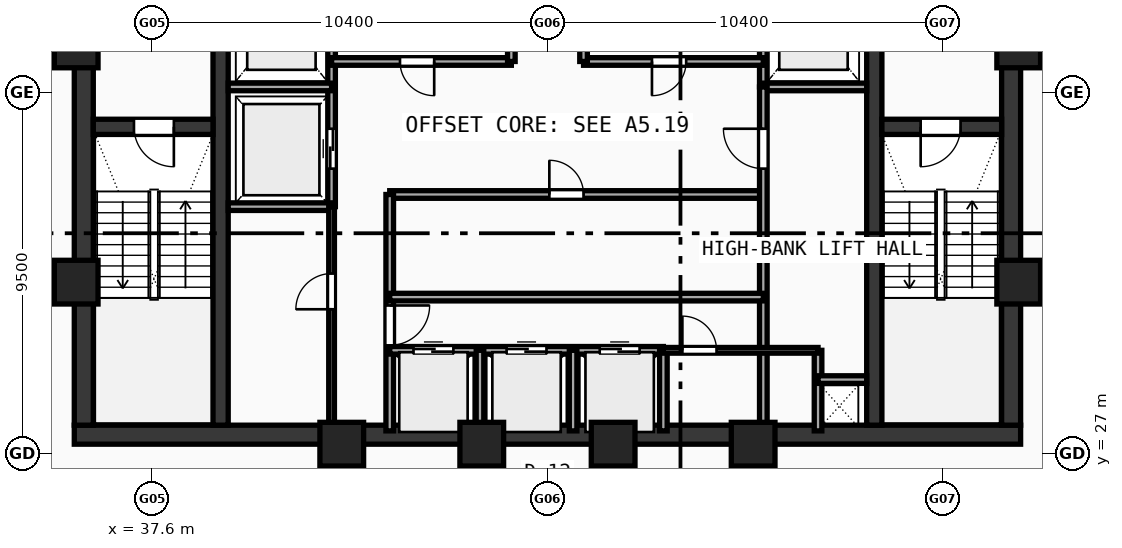
"""IFC4 building model, lengths in metres.
Left out: names, types, materials, properties, quantities, classifications, styles, units other than length and angle.
Written with IfcOpenShell. Run it as: python <this file> out.ifc"""

import sys

from ifc_helpers import new_model, si_unit, direction, frame, frame_2d, origin, origin_with_axes, origin_2d, place, context, subcontext, project, spatial, rectangle, hollow_rectangle, extrude, source, transform, mapped, element, fill, save


model = new_model("IFC4")
c1 = context("Model", 3, precision=1e-05, world=origin(), true_north=direction((0.0, 1.0)))
c2 = subcontext(c1, "Body", "Model", "MODEL_VIEW")
j1 = project(units=[si_unit("LENGTHUNIT", "METRE"), si_unit("PLANEANGLEUNIT", "RADIAN")], contexts=[c1])
p1 = place(None, origin())
s1 = spatial("IfcSite", under=j1, at=p1, CompositionType="ELEMENT")
p2 = place(p1, origin())
s2 = spatial("IfcBuilding", under=s1, at=p2, CompositionType="ELEMENT")
p3 = place(p2, frame((0.0, 0.0, 307.4)))
s3 = spatial("IfcBuildingStorey", under=s2, at=p3, CompositionType="ELEMENT", Elevation=307.4)
p4 = place(p3, frame((35.55, 27.5, 0.0), z_axis=(0.0, 0.0, 1.0), x_axis=(1.0, 0.0, 0.0)))
e1 = element("IfcWall", 1, at=p4, inside=s3, PredefinedType="SHEAR", context=c2, shape_type="SweptSolid", body=[
    extrude(rectangle(XDim=24.9, YDim=0.5, at=frame_2d((12.45, 0.0))), origin(), (0.0, 0.0, 1.0), 3.47),
])
for number, where, z_axis, x_axis in (
    (2, (35.8, 27.75, 0.0), (0.0, 0.0, 1.0), (0.0, 1.0, 0.0)),
    (3, (60.2, 27.75, 0.0), (0.0, 0.0, 1.0), (0.0, 1.0, 0.0)),
):
    element("IfcWall", number, at=place(p3, frame(where, z_axis=z_axis, x_axis=x_axis)), inside=s3, PredefinedType="SHEAR", context=c2, shape_type="SweptSolid", body=[
        extrude(rectangle(XDim=12.2, YDim=0.5, at=frame_2d((6.1, 0.0))), origin(), (0.0, 0.0, 1.0), 3.47),
    ])
p5 = place(p3, frame((39.4, 27.75, 0.0), z_axis=(0.0, 0.0, 1.0), x_axis=(0.0, 1.0, 0.0)))
e4 = element("IfcWall", 4, at=p5, inside=s3, PredefinedType="SHEAR", context=c2, shape_type="SweptSolid", body=[
    extrude(rectangle(XDim=12.2, YDim=0.4, at=frame_2d((6.1, 0.0))), origin(), (0.0, 0.0, 1.0), 3.47),
])
p6 = place(p5, frame((10.0, 0.0, 0.0)))
e5 = element("IfcOpeningElement", 5, at=p6, cuts=e4, PredefinedType="OPENING", context=c2, shape_type="SweptSolid", body=[
    extrude(rectangle(XDim=1.1, YDim=2.1, at=frame_2d((0.55, 1.05))), frame((0.0, 0.21, 0.0), z_axis=(0.0, -1.0, 0.0), x_axis=(1.0, 0.0, 0.0)), (0.0, 0.0, 1.0), 0.42),
])
p7 = place(p3, frame((56.6, 27.75, 0.0), z_axis=(0.0, 0.0, 1.0), x_axis=(0.0, 1.0, 0.0)))
e6 = element("IfcWall", 6, at=p7, inside=s3, PredefinedType="SHEAR", context=c2, shape_type="SweptSolid", body=[
    extrude(rectangle(XDim=12.2, YDim=0.4, at=frame_2d((6.1, 0.0))), origin(), (0.0, 0.0, 1.0), 3.47),
])
p8 = place(p7, frame((10.0, 0.0, 0.0)))
e7 = element("IfcOpeningElement", 7, at=p8, cuts=e6, PredefinedType="OPENING", context=c2, shape_type="SweptSolid", body=[
    extrude(rectangle(XDim=1.1, YDim=2.1, at=frame_2d((0.55, 1.05))), frame((0.0, 0.21, 0.0), z_axis=(0.0, -1.0, 0.0), x_axis=(1.0, 0.0, 0.0)), (0.0, 0.0, 1.0), 0.42),
])
p9 = place(p3, frame((36.05, 35.6, 0.0), z_axis=(0.0, 0.0, 1.0), x_axis=(1.0, 0.0, 0.0)))
e8 = element("IfcWall", 8, at=p9, inside=s3, PredefinedType="SHEAR", context=c2, shape_type="SweptSolid", body=[
    extrude(rectangle(XDim=3.15, YDim=0.4, at=frame_2d((1.575, 0.0))), origin(), (0.0, 0.0, 1.0), 3.47),
])
p10 = place(p9, frame((1.07, 0.0, 0.0)))
e9 = element("IfcOpeningElement", 9, at=p10, cuts=e8, PredefinedType="OPENING", context=c2, shape_type="SweptSolid", body=[
    extrude(rectangle(XDim=1.05, YDim=2.1, at=frame_2d((0.525, 1.05))), frame((0.0, 0.21, 0.0), z_axis=(0.0, -1.0, 0.0), x_axis=(1.0, 0.0, 0.0)), (0.0, 0.0, 1.0), 0.42),
])
p11 = place(p3, frame((56.8, 35.6, 0.0), z_axis=(0.0, 0.0, 1.0), x_axis=(1.0, 0.0, 0.0)))
e10 = element("IfcWall", 10, at=p11, inside=s3, PredefinedType="SHEAR", context=c2, shape_type="SweptSolid", body=[
    extrude(rectangle(XDim=3.15, YDim=0.4, at=frame_2d((1.575, 0.0))), origin(), (0.0, 0.0, 1.0), 3.47),
])
p12 = place(p11, frame((1.02, 0.0, 0.0)))
e11 = element("IfcOpeningElement", 11, at=p12, cuts=e10, PredefinedType="OPENING", context=c2, shape_type="SweptSolid", body=[
    extrude(rectangle(XDim=1.05, YDim=2.1, at=frame_2d((0.525, 1.05))), frame((0.0, 0.21, 0.0), z_axis=(0.0, -1.0, 0.0), x_axis=(1.0, 0.0, 0.0)), (0.0, 0.0, 1.0), 0.42),
])
m1 = source(origin(), c2, "Body", "SweptSolid", [
    extrude(hollow_rectangle(XDim=1.15, YDim=1.15, WallThickness=0.048, at=origin_2d()), origin(), (0.0, 0.0, 1.0), 3.73),
])
for number, where, z_axis, x_axis in (
    (12, (42.588, 27.25, -0.26), (0.0, 0.0, 1.0), (1.0, 0.0, 0.0)),
    (13, (46.272, 27.25, -0.26), (0.0, 0.0, 1.0), (1.0, 0.0, 0.0)),
    (14, (49.729, 27.25, -0.26), (0.0, 0.0, 1.0), (1.0, 0.0, 0.0)),
    (15, (53.412, 27.25, -0.26), (0.0, 0.0, 1.0), (1.0, 0.0, 0.0)),
    (16, (60.4, 31.513, -0.26), (0.0, 0.0, 1.0), (1.0, 0.0, 0.0)),
    (17, (60.4, 37.729, -0.26), (0.0, 0.0, 1.0), (1.0, 0.0, 0.0)),
    (18, (35.6, 37.729, -0.26), (0.0, 0.0, 1.0), (1.0, 0.0, 0.0)),
    (19, (35.6, 31.513, -0.26), (0.0, 0.0, 1.0), (1.0, 0.0, 0.0)),
):
    element("IfcColumn", number, at=place(p3, frame(where, z_axis=z_axis, x_axis=x_axis)), inside=s3, PredefinedType="COLUMN", context=c2, shape_type="MappedRepresentation", body=[
        mapped(m1, transform((0.0, 0.0, 0.0), scale=1.0)),
    ])
p13 = place(p3, frame((42.32, 33.5, 0.0), z_axis=(0.0, 0.0, 1.0), x_axis=(0.0, 1.0, 0.0)))
e20 = element("IfcWall", 20, at=p13, inside=s3, PredefinedType="SOLIDWALL", context=c2, shape_type="SweptSolid", body=[
    extrude(rectangle(XDim=6.45, YDim=0.2, at=frame_2d((3.225, 0.0))), origin(), (0.0, 0.0, 1.0), 3.47),
])
p14 = place(p13, frame((1.0, 0.0, 0.0)))
e21 = element("IfcOpeningElement", 21, at=p14, cuts=e20, PredefinedType="OPENING", context=c2, shape_type="SweptSolid", body=[
    extrude(rectangle(XDim=1.05, YDim=2.1, at=frame_2d((0.525, 1.05))), frame((0.0, 0.11, 0.0), z_axis=(0.0, -1.0, 0.0), x_axis=(1.0, 0.0, 0.0)), (0.0, 0.0, 1.0), 0.22),
])
for number, where, z_axis, x_axis in (
    (22, (39.6, 36.65, 0.0), (0.0, 0.0, 1.0), (1.0, 0.0, 0.0)),
    (23, (39.6, 33.5, 0.0), (0.0, 0.0, 1.0), (1.0, 0.0, 0.0)),
):
    element("IfcWall", number, at=place(p3, frame(where, z_axis=z_axis, x_axis=x_axis)), inside=s3, PredefinedType="SOLIDWALL", context=c2, shape_type="SweptSolid", body=[
        extrude(rectangle(XDim=2.72, YDim=0.2, at=frame_2d((1.36, 0.0))), origin(), (0.0, 0.0, 1.0), 3.47),
    ])
p15 = place(p3, frame((53.68, 36.65, 0.0), z_axis=(0.0, 0.0, 1.0), x_axis=(0.0, 1.0, 0.0)))
e24 = element("IfcWall", 24, at=p15, inside=s3, PredefinedType="SOLIDWALL", context=c2, shape_type="SweptSolid", body=[
    extrude(rectangle(XDim=3.3, YDim=0.2, at=frame_2d((1.65, 0.0))), origin(), (0.0, 0.0, 1.0), 3.47),
])
p16 = place(p3, frame((53.68, 36.65, 0.0), z_axis=(0.0, 0.0, 1.0), x_axis=(1.0, 0.0, 0.0)))
e25 = element("IfcWall", 25, at=p16, inside=s3, PredefinedType="SOLIDWALL", context=c2, shape_type="SweptSolid", body=[
    extrude(rectangle(XDim=2.72, YDim=0.2, at=frame_2d((1.36, 0.0))), origin(), (0.0, 0.0, 1.0), 3.47),
])
p17 = place(p3, frame((42.32, 37.32, 0.0), z_axis=(0.0, 0.0, 1.0), x_axis=(1.0, 0.0, 0.0)))
e26 = element("IfcWall", 26, at=p17, inside=s3, PredefinedType="SOLIDWALL", context=c2, shape_type="SweptSolid", body=[
    extrude(rectangle(XDim=4.73, YDim=0.2, at=frame_2d((2.365, 0.0))), origin(), (0.0, 0.0, 1.0), 3.47),
])
p18 = place(p17, frame((1.8, 0.0, 0.0)))
e27 = element("IfcOpeningElement", 27, at=p18, cuts=e26, PredefinedType="OPENING", context=c2, shape_type="SweptSolid", body=[
    extrude(rectangle(XDim=0.9, YDim=2.1, at=frame_2d((0.45, 1.05))), frame((0.0, 0.11, 0.0), z_axis=(0.0, -1.0, 0.0), x_axis=(1.0, 0.0, 0.0)), (0.0, 0.0, 1.0), 0.22),
])
p19 = place(p3, frame((48.95, 37.32, 0.0), z_axis=(0.0, 0.0, 1.0), x_axis=(1.0, 0.0, 0.0)))
e28 = element("IfcWall", 28, at=p19, inside=s3, PredefinedType="SOLIDWALL", context=c2, shape_type="SweptSolid", body=[
    extrude(rectangle(XDim=4.73, YDim=0.2, at=frame_2d((2.365, 0.0))), origin(), (0.0, 0.0, 1.0), 3.47),
])
p20 = place(p19, frame((1.8, 0.0, 0.0)))
e29 = element("IfcOpeningElement", 29, at=p20, cuts=e28, PredefinedType="OPENING", context=c2, shape_type="SweptSolid", body=[
    extrude(rectangle(XDim=0.9, YDim=2.1, at=frame_2d((0.45, 1.05))), frame((0.0, 0.11, 0.0), z_axis=(0.0, -1.0, 0.0), x_axis=(1.0, 0.0, 0.0)), (0.0, 0.0, 1.0), 0.22),
])
for number, where, z_axis, x_axis in (
    (30, (47.05, 37.32, 0.0), (0.0, 0.0, 1.0), (0.0, 1.0, 0.0)),
    (31, (48.95, 37.32, 0.0), (0.0, 0.0, 1.0), (0.0, 1.0, 0.0)),
):
    element("IfcWall", number, at=place(p3, frame(where, z_axis=z_axis, x_axis=x_axis)), inside=s3, PredefinedType="SOLIDWALL", context=c2, shape_type="SweptSolid", body=[
        extrude(rectangle(XDim=2.63, YDim=0.2, at=frame_2d((1.315, 0.0))), origin(), (0.0, 0.0, 1.0), 3.47),
    ])
p21 = place(p3, frame((43.85, 33.82, 0.0), z_axis=(0.0, 0.0, 1.0), x_axis=(1.0, 0.0, 0.0)))
e32 = element("IfcWall", 32, at=p21, inside=s3, PredefinedType="SOLIDWALL", context=c2, shape_type="SweptSolid", body=[
    extrude(rectangle(XDim=9.83, YDim=0.2, at=frame_2d((4.915, 0.0))), origin(), (0.0, 0.0, 1.0), 3.47),
])
p22 = place(p21, frame((4.2, 0.0, 0.0)))
e33 = element("IfcOpeningElement", 33, at=p22, cuts=e32, PredefinedType="OPENING", context=c2, shape_type="SweptSolid", body=[
    extrude(rectangle(XDim=0.9, YDim=2.1, at=frame_2d((0.45, 1.05))), frame((0.0, 0.11, 0.0), z_axis=(0.0, -1.0, 0.0), x_axis=(1.0, 0.0, 0.0)), (0.0, 0.0, 1.0), 0.22),
])
p23 = place(p3, frame((43.85, 27.6, 0.0), z_axis=(0.0, 0.0, 1.0), x_axis=(0.0, 1.0, 0.0)))
e34 = element("IfcWall", 34, at=p23, inside=s3, PredefinedType="SOLIDWALL", context=c2, shape_type="SweptSolid", body=[
    extrude(rectangle(XDim=6.22, YDim=0.2, at=frame_2d((3.11, 0.0))), origin(), (0.0, 0.0, 1.0), 3.47),
])
p24 = place(p23, frame((2.25, 0.0, 0.0)))
e35 = element("IfcOpeningElement", 35, at=p24, cuts=e34, PredefinedType="OPENING", context=c2, shape_type="SweptSolid", body=[
    extrude(rectangle(XDim=1.05, YDim=2.1, at=frame_2d((0.525, 1.05))), frame((0.0, 0.11, 0.0), z_axis=(0.0, -1.0, 0.0), x_axis=(1.0, 0.0, 0.0)), (0.0, 0.0, 1.0), 0.22),
])
p25 = place(p3, frame((53.68, 27.6, 0.0), z_axis=(0.0, 0.0, 1.0), x_axis=(0.0, 1.0, 0.0)))
e36 = element("IfcWall", 36, at=p25, inside=s3, PredefinedType="SOLIDWALL", context=c2, shape_type="SweptSolid", body=[
    extrude(rectangle(XDim=9.05, YDim=0.2, at=frame_2d((4.525, 0.0))), origin(), (0.0, 0.0, 1.0), 3.47),
])
p26 = place(p25, frame((6.9, 0.0, 0.0)))
e37 = element("IfcOpeningElement", 37, at=p26, cuts=e36, PredefinedType="OPENING", context=c2, shape_type="SweptSolid", body=[
    extrude(rectangle(XDim=1.05, YDim=2.1, at=frame_2d((0.525, 1.05))), frame((0.0, 0.11, 0.0), z_axis=(0.0, -1.0, 0.0), x_axis=(1.0, 0.0, 0.0)), (0.0, 0.0, 1.0), 0.22),
])
p27 = place(p3, frame((43.85, 29.72, 0.0), z_axis=(0.0, 0.0, 1.0), x_axis=(1.0, 0.0, 0.0)))
e38 = element("IfcWall", 38, at=p27, inside=s3, PredefinedType="SOLIDWALL", context=c2, shape_type="SweptSolid", body=[
    extrude(rectangle(XDim=7.2, YDim=0.2, at=frame_2d((3.6, 0.0))), origin(), (0.0, 0.0, 1.0), 3.47),
])
p28 = place(p27, frame((0.625, 0.0, 0.0)))
e39 = element("IfcOpeningElement", 39, at=p28, cuts=e38, PredefinedType="OPENING", context=c2, shape_type="SweptSolid", body=[
    extrude(rectangle(XDim=1.05, YDim=2.1, at=frame_2d((0.525, 1.05))), frame((0.0, 0.11, 0.0), z_axis=(0.0, -1.0, 0.0), x_axis=(1.0, 0.0, 0.0)), (0.0, 0.0, 1.0), 0.22),
])
p29 = place(p27, frame((3.075, 0.0, 0.0)))
e40 = element("IfcOpeningElement", 40, at=p29, cuts=e38, PredefinedType="OPENING", context=c2, shape_type="SweptSolid", body=[
    extrude(rectangle(XDim=1.05, YDim=2.1, at=frame_2d((0.525, 1.05))), frame((0.0, 0.11, 0.0), z_axis=(0.0, -1.0, 0.0), x_axis=(1.0, 0.0, 0.0)), (0.0, 0.0, 1.0), 0.22),
])
p30 = place(p27, frame((5.525, 0.0, 0.0)))
e41 = element("IfcOpeningElement", 41, at=p30, cuts=e38, PredefinedType="OPENING", context=c2, shape_type="SweptSolid", body=[
    extrude(rectangle(XDim=1.05, YDim=2.1, at=frame_2d((0.525, 1.05))), frame((0.0, 0.11, 0.0), z_axis=(0.0, -1.0, 0.0), x_axis=(1.0, 0.0, 0.0)), (0.0, 0.0, 1.0), 0.22),
])
p31 = place(p3, frame((51.05, 27.6, 0.0), z_axis=(0.0, 0.0, 1.0), x_axis=(0.0, 1.0, 0.0)))
e42 = element("IfcWall", 42, at=p31, inside=s3, PredefinedType="SOLIDWALL", context=c2, shape_type="SweptSolid", body=[
    extrude(rectangle(XDim=2.12, YDim=0.2, at=frame_2d((1.06, 0.0))), origin(), (0.0, 0.0, 1.0), 3.47),
])
p32 = place(p3, frame((43.85, 31.12, 0.0), z_axis=(0.0, 0.0, 1.0), x_axis=(1.0, 0.0, 0.0)))
e43 = element("IfcWall", 43, at=p32, inside=s3, PredefinedType="SOLIDWALL", context=c2, shape_type="SweptSolid", body=[
    extrude(rectangle(XDim=9.83, YDim=0.2, at=frame_2d((4.915, 0.0))), origin(), (0.0, 0.0, 1.0), 3.47),
])
for number, where, z_axis, x_axis in (
    (44, (46.225, 27.6, 0.0), (0.0, 0.0, 1.0), (0.0, 1.0, 0.0)),
    (45, (48.675, 27.6, 0.0), (0.0, 0.0, 1.0), (0.0, 1.0, 0.0)),
    (46, (55.12, 27.6, 0.0), (0.0, 0.0, 1.0), (0.0, 1.0, 0.0)),
):
    element("IfcWall", number, at=place(p3, frame(where, z_axis=z_axis, x_axis=x_axis)), inside=s3, PredefinedType="SOLIDWALL", context=c2, shape_type="SweptSolid", body=[
        extrude(rectangle(XDim=2.12, YDim=0.2, at=frame_2d((1.06, 0.0))), origin(), (0.0, 0.0, 1.0), 3.47),
    ])
p33 = place(p3, frame((55.12, 28.95, 0.0), z_axis=(0.0, 0.0, 1.0), x_axis=(1.0, 0.0, 0.0)))
e47 = element("IfcWall", 47, at=p33, inside=s3, PredefinedType="SOLIDWALL", context=c2, shape_type="SweptSolid", body=[
    extrude(rectangle(XDim=1.28, YDim=0.2, at=frame_2d((0.64, 0.0))), origin(), (0.0, 0.0, 1.0), 3.47),
])
p34 = place(p3, frame((42.32, 27.6, 0.0), z_axis=(0.0, 0.0, 1.0), x_axis=(0.0, 1.0, 0.0)))
e48 = element("IfcWall", 48, at=p34, inside=s3, PredefinedType="PARTITIONING", context=c2, shape_type="SweptSolid", body=[
    extrude(rectangle(XDim=5.9, YDim=0.15, at=frame_2d((2.95, 0.0))), origin(), (0.0, 0.0, 1.0), 3.47),
])
p35 = place(p34, frame((3.2, 0.0, 0.0)))
e49 = element("IfcOpeningElement", 49, at=p35, cuts=e48, PredefinedType="OPENING", context=c2, shape_type="SweptSolid", body=[
    extrude(rectangle(XDim=0.94, YDim=2.1, at=frame_2d((0.47, 1.05))), frame((0.0, 0.085, 0.0), z_axis=(0.0, -1.0, 0.0), x_axis=(1.0, 0.0, 0.0)), (0.0, 0.0, 1.0), 0.17),
])
p36 = place(p3, frame((51.05, 29.72, 0.0), z_axis=(0.0, 0.0, 1.0), x_axis=(1.0, 0.0, 0.0)))
e50 = element("IfcWall", 50, at=p36, inside=s3, PredefinedType="PARTITIONING", context=c2, shape_type="SweptSolid", body=[
    extrude(rectangle(XDim=4.07, YDim=0.15, at=frame_2d((2.035, 0.0))), origin(), (0.0, 0.0, 1.0), 3.47),
])
p37 = place(p36, frame((0.5, 0.0, 0.0)))
e51 = element("IfcOpeningElement", 51, at=p37, cuts=e50, PredefinedType="OPENING", context=c2, shape_type="SweptSolid", body=[
    extrude(rectangle(XDim=0.9, YDim=2.1, at=frame_2d((0.45, 1.05))), frame((0.0, 0.085, 0.0), z_axis=(0.0, -1.0, 0.0), x_axis=(1.0, 0.0, 0.0)), (0.0, 0.0, 1.0), 0.17),
])
m2 = source(origin(), c2, "Body", "SweptSolid", [
    extrude(rectangle(XDim=1.05, YDim=2.1, at=frame_2d((0.525, 1.05))), frame((0.0, 0.025, 0.0), z_axis=(0.0, -1.0, 0.0), x_axis=(1.0, 0.0, 0.0)), (0.0, 0.0, 1.0), 0.05),
])
p38 = place(p10, frame((1.05, 0.0, 0.0), z_axis=(0.0, 0.0, 1.0), x_axis=(-1.0, 0.0, 0.0)))
e52 = element("IfcDoor", 52, at=p38, inside=s3, OperationType="SINGLE_SWING_LEFT", PredefinedType="DOOR", context=c2, shape_type="MappedRepresentation", body=[
    mapped(m2, transform((0.0, 0.0, 0.0), scale=1.0)),
])
fill(e9, e52)
p39 = place(p12, frame((1.05, 0.0, 0.0), z_axis=(0.0, 0.0, 1.0), x_axis=(-1.0, 0.0, 0.0)))
e53 = element("IfcDoor", 53, at=p39, inside=s3, OperationType="SINGLE_SWING_RIGHT", PredefinedType="DOOR", context=c2, shape_type="MappedRepresentation", body=[
    mapped(m2, transform((0.0, 0.0, 0.0), scale=1.0)),
])
fill(e11, e53)
p40 = place(p14, origin_with_axes())
e54 = element("IfcDoor", 54, at=p40, inside=s3, OperationType="DOUBLE_DOOR_SLIDING", PredefinedType="DOOR", context=c2, shape_type="MappedRepresentation", body=[
    mapped(m2, transform((0.0, 0.0, 0.0), scale=1.0)),
])
fill(e21, e54)
m3 = source(origin(), c2, "Body", "SweptSolid", [
    extrude(rectangle(XDim=0.9, YDim=2.1, at=frame_2d((0.45, 1.05))), frame((0.0, 0.025, 0.0), z_axis=(0.0, -1.0, 0.0), x_axis=(1.0, 0.0, 0.0)), (0.0, 0.0, 1.0), 0.05),
])
p41 = place(p18, frame((0.9, 0.0, 0.0), z_axis=(0.0, 0.0, 1.0), x_axis=(-1.0, 0.0, 0.0)))
e55 = element("IfcDoor", 55, at=p41, inside=s3, OperationType="SINGLE_SWING_LEFT", PredefinedType="DOOR", context=c2, shape_type="MappedRepresentation", body=[
    mapped(m3, transform((0.0, 0.0, 0.0), scale=1.0)),
])
fill(e27, e55)
p42 = place(p20, frame((0.9, 0.0, 0.0), z_axis=(0.0, 0.0, 1.0), x_axis=(-1.0, 0.0, 0.0)))
e56 = element("IfcDoor", 56, at=p42, inside=s3, OperationType="SINGLE_SWING_RIGHT", PredefinedType="DOOR", context=c2, shape_type="MappedRepresentation", body=[
    mapped(m3, transform((0.0, 0.0, 0.0), scale=1.0)),
])
fill(e29, e56)
p43 = place(p22, origin_with_axes())
e57 = element("IfcDoor", 57, at=p43, inside=s3, OperationType="SINGLE_SWING_LEFT", PredefinedType="DOOR", context=c2, shape_type="MappedRepresentation", body=[
    mapped(m3, transform((0.0, 0.0, 0.0), scale=1.0)),
])
fill(e33, e57)
p44 = place(p24, frame((1.05, 0.0, 0.0), z_axis=(0.0, 0.0, 1.0), x_axis=(-1.0, 0.0, 0.0)))
e58 = element("IfcDoor", 58, at=p44, inside=s3, OperationType="SINGLE_SWING_LEFT", PredefinedType="DOOR", context=c2, shape_type="MappedRepresentation", body=[
    mapped(m2, transform((0.0, 0.0, 0.0), scale=1.0)),
])
fill(e35, e58)
p45 = place(p26, origin_with_axes())
e59 = element("IfcDoor", 59, at=p45, inside=s3, OperationType="SINGLE_SWING_RIGHT", PredefinedType="DOOR", context=c2, shape_type="MappedRepresentation", body=[
    mapped(m2, transform((0.0, 0.0, 0.0), scale=1.0)),
])
fill(e37, e59)
p46 = place(p28, origin_with_axes())
e60 = element("IfcDoor", 60, at=p46, inside=s3, OperationType="DOUBLE_DOOR_SLIDING", PredefinedType="DOOR", context=c2, shape_type="MappedRepresentation", body=[
    mapped(m2, transform((0.0, 0.0, 0.0), scale=1.0)),
])
fill(e39, e60)
p47 = place(p29, origin_with_axes())
e61 = element("IfcDoor", 61, at=p47, inside=s3, OperationType="DOUBLE_DOOR_SLIDING", PredefinedType="DOOR", context=c2, shape_type="MappedRepresentation", body=[
    mapped(m2, transform((0.0, 0.0, 0.0), scale=1.0)),
])
fill(e40, e61)
p48 = place(p30, origin_with_axes())
e62 = element("IfcDoor", 62, at=p48, inside=s3, OperationType="DOUBLE_DOOR_SLIDING", PredefinedType="DOOR", context=c2, shape_type="MappedRepresentation", body=[
    mapped(m2, transform((0.0, 0.0, 0.0), scale=1.0)),
])
fill(e41, e62)
m4 = source(origin(), c2, "Body", "SweptSolid", [
    extrude(rectangle(XDim=0.94, YDim=2.1, at=frame_2d((0.47, 1.05))), frame((0.0, 0.025, 0.0), z_axis=(0.0, -1.0, 0.0), x_axis=(1.0, 0.0, 0.0)), (0.0, 0.0, 1.0), 0.05),
])
p49 = place(p35, origin_with_axes())
e63 = element("IfcDoor", 63, at=p49, inside=s3, OperationType="SINGLE_SWING_LEFT", PredefinedType="DOOR", context=c2, shape_type="MappedRepresentation", body=[
    mapped(m4, transform((0.0, 0.0, 0.0), scale=1.0)),
])
fill(e49, e63)
p50 = place(p37, origin_with_axes())
e64 = element("IfcDoor", 64, at=p50, inside=s3, OperationType="SINGLE_SWING_LEFT", PredefinedType="DOOR", context=c2, shape_type="MappedRepresentation", body=[
    mapped(m3, transform((0.0, 0.0, 0.0), scale=1.0)),
])
fill(e51, e64)
save(model, sys.argv[1])
